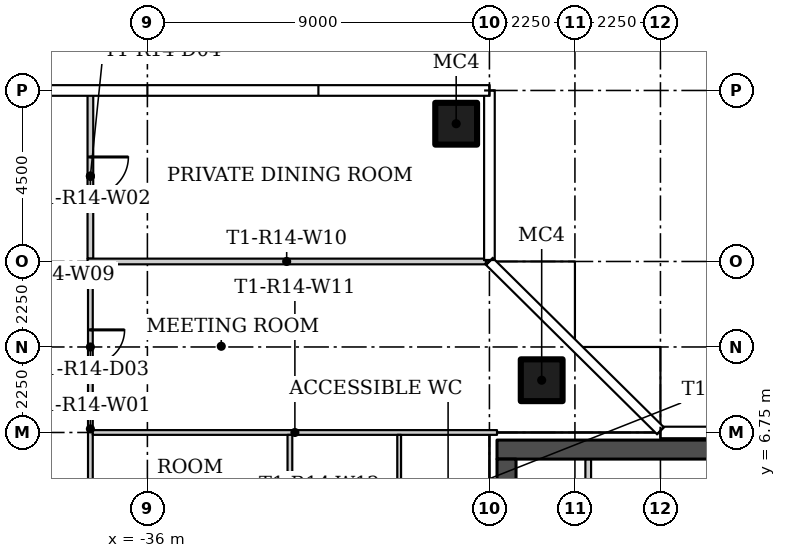
"""IFC4 building model, lengths in metres.
Left out: names, types, materials, properties, quantities, classifications, styles, units other than length and angle.
Written with IfcOpenShell. Run it as: python <this file> out.ifc"""

import sys

from ifc_helpers import new_model, si_unit, direction, frame, frame_2d, origin, origin_2d, place, context, subcontext, project, spatial, rectangle, hollow_rectangle, extrude, element, fill, save


model = new_model("IFC4")
c1 = context("Model", 3, precision=1e-05, world=origin(), true_north=direction((0.0, 1.0)))
c2 = subcontext(c1, "Body", "Model", "MODEL_VIEW")
j1 = project(units=[si_unit("LENGTHUNIT", "METRE"), si_unit("PLANEANGLEUNIT", "RADIAN")], contexts=[c1])
p1 = place(None, origin())
s1 = spatial("IfcSite", under=j1, at=p1, CompositionType="ELEMENT")
p2 = place(p1, origin())
s2 = spatial("IfcBuilding", under=s1, at=p2, CompositionType="ELEMENT")
p3 = place(p2, frame((0.0, 0.0, 138.9)))
s3 = spatial("IfcBuildingStorey", under=s2, at=p3, CompositionType="ELEMENT", Elevation=138.9)
for number, where in (
    (1, (-25.625, 8.125, 0.0)),
    (2, (-27.875, 14.875, 0.0)),
):
    element("IfcColumn", number, at=place(p3, frame(where)), inside=s3, PredefinedType="COLUMN", context=c2, shape_type="SweptSolid", body=[
        extrude(hollow_rectangle(XDim=1.1, YDim=1.1, WallThickness=0.04, at=origin_2d()), origin(), (0.0, 0.0, 1.0), 3.55),
    ])
p4 = place(p3, frame((-37.5, 11.175, 0.0), z_axis=(0.0, 0.0, 1.0), x_axis=(0.0, -1.0, 0.0)))
e3 = element("IfcWall", 3, at=p4, inside=s3, PredefinedType="PARTITIONING", context=c2, shape_type="SweptSolid", body=[
    extrude(rectangle(XDim=8.662, YDim=0.125, at=frame_2d((4.331, 0.0))), origin(), (0.0, 0.0, 1.0), 3.55),
])
p5 = place(p4, frame((1.725, 0.0, 0.0)))
e4 = element("IfcOpeningElement", 4, at=p5, cuts=e3, PredefinedType="OPENING", context=c2, shape_type="SweptSolid", body=[
    extrude(rectangle(XDim=0.9, YDim=2.1, at=frame_2d((0.45, 1.05))), frame((0.0, 0.073, 0.0), z_axis=(0.0, -1.0, 0.0), x_axis=(1.0, 0.0, 0.0)), (0.0, 0.0, 1.0), 0.145),
])
p6 = place(p3, frame((-37.5, 15.655, 0.0), z_axis=(0.0, 0.0, 1.0), x_axis=(0.0, -1.0, 0.0)))
e5 = element("IfcWall", 5, at=p6, inside=s3, PredefinedType="PARTITIONING", context=c2, shape_type="SweptSolid", body=[
    extrude(rectangle(XDim=4.33, YDim=0.15, at=frame_2d((2.165, 0.0))), origin(), (0.0, 0.0, 1.0), 3.55),
])
p7 = place(p6, frame((1.655, 0.0, 0.0)))
e6 = element("IfcOpeningElement", 6, at=p7, cuts=e5, PredefinedType="OPENING", context=c2, shape_type="SweptSolid", body=[
    extrude(rectangle(XDim=1.0, YDim=2.4, at=frame_2d((0.5, 1.2))), frame((0.0, 0.085, 0.0), z_axis=(0.0, -1.0, 0.0), x_axis=(1.0, 0.0, 0.0)), (0.0, 0.0, 1.0), 0.17),
])
p8 = place(p3, frame((-27.095, 11.25, 0.0), z_axis=(0.0, 0.0, 1.0), x_axis=(-1.0, 0.0, 0.0)))
e7 = element("IfcWall", 7, at=p8, inside=s3, PredefinedType="PARTITIONING", context=c2, shape_type="SweptSolid", body=[
    extrude(rectangle(XDim=10.48, YDim=0.15, at=frame_2d((5.24, 0.0))), origin(), (0.0, 0.0, 1.0), 3.55),
])
p9 = place(p3, frame((-37.438, 6.75, 0.0)))
e8 = element("IfcWall", 8, at=p9, inside=s3, PredefinedType="PARTITIONING", context=c2, shape_type="SweptSolid", body=[
    extrude(rectangle(XDim=10.637, YDim=0.125, at=frame_2d((5.319, 0.0))), origin(), (0.0, 0.0, 1.0), 3.55),
])
p10 = place(p3, frame((-32.25, 2.513, 0.0), z_axis=(0.0, 0.0, 1.0), x_axis=(0.0, 1.0, 0.0)))
e9 = element("IfcWall", 9, at=p10, inside=s3, PredefinedType="PARTITIONING", context=c2, shape_type="SweptSolid", body=[
    extrude(rectangle(XDim=4.175, YDim=0.125, at=frame_2d((2.087, 0.0))), origin(), (0.0, 0.0, 1.0), 3.55),
])
p11 = place(p3, frame((-29.375, 2.5, 0.0), z_axis=(0.0, 0.0, 1.0), x_axis=(0.0, 1.0, 0.0)))
e10 = element("IfcWall", 10, at=p11, inside=s3, PredefinedType="PARTITIONING", context=c2, shape_type="SweptSolid", body=[
    extrude(rectangle(XDim=4.187, YDim=0.1, at=frame_2d((2.094, 0.0))), origin(), (0.0, 0.0, 1.0), 3.55),
])
p12 = place(p3, frame((-26.8, 6.3, 0.0)))
e11 = element("IfcWall", 11, at=p12, inside=s3, PredefinedType="SHEAR", context=c2, shape_type="SweptSolid", body=[
    extrude(rectangle(XDim=13.1, YDim=0.5, at=frame_2d((6.55, 0.0))), origin(), (0.0, 0.0, 1.0), 3.55),
])
p13 = place(p3, frame((-26.55, 6.05, 0.0), z_axis=(0.0, 0.0, 1.0), x_axis=(0.0, -1.0, 0.0)))
e12 = element("IfcWall", 12, at=p13, inside=s3, PredefinedType="SHEAR", context=c2, shape_type="SweptSolid", body=[
    extrude(rectangle(XDim=12.1, YDim=0.5, at=frame_2d((6.05, 0.0))), origin(), (0.0, 0.0, 1.0), 3.55),
])
p14 = place(p13, frame((3.9, 0.0, 0.0)))
e13 = element("IfcOpeningElement", 13, at=p14, cuts=e12, PredefinedType="OPENING", context=c2, shape_type="SweptSolid", body=[
    extrude(rectangle(XDim=1.8, YDim=2.4, at=frame_2d((0.9, 1.2))), frame((0.0, 0.26, 0.0), z_axis=(0.0, -1.0, 0.0), x_axis=(1.0, 0.0, 0.0)), (0.0, 0.0, 1.0), 0.52),
])
p15 = place(p3, frame((-24.4, 3.25, 0.0), z_axis=(0.0, 0.0, 1.0), x_axis=(0.0, 1.0, 0.0)))
e14 = element("IfcWall", 14, at=p15, inside=s3, PredefinedType="PARTITIONING", context=c2, shape_type="SweptSolid", body=[
    extrude(rectangle(XDim=2.8, YDim=0.15, at=frame_2d((1.4, 0.0))), origin(), (0.0, 0.0, 1.0), 3.55),
])
p16 = place(p5, origin())
e15 = element("IfcDoor", 15, at=p16, inside=s3, OperationType="SINGLE_SWING_RIGHT", PredefinedType="DOOR", context=c2, shape_type="SweptSolid", body=[
    extrude(rectangle(XDim=0.9, YDim=2.1, at=frame_2d((0.45, 1.05))), frame((0.0, 0.025, 0.0), z_axis=(0.0, -1.0, 0.0), x_axis=(1.0, 0.0, 0.0)), (0.0, 0.0, 1.0), 0.05),
])
fill(e4, e15)
p17 = place(p7, origin())
e16 = element("IfcDoor", 16, at=p17, inside=s3, OperationType="SINGLE_SWING_RIGHT", PredefinedType="DOOR", context=c2, shape_type="SweptSolid", body=[
    extrude(rectangle(XDim=1.0, YDim=2.4, at=frame_2d((0.5, 1.2))), frame((0.0, 0.025, 0.0), z_axis=(0.0, -1.0, 0.0), x_axis=(1.0, 0.0, 0.0)), (0.0, 0.0, 1.0), 0.05),
])
fill(e6, e16)
save(model, sys.argv[1])
